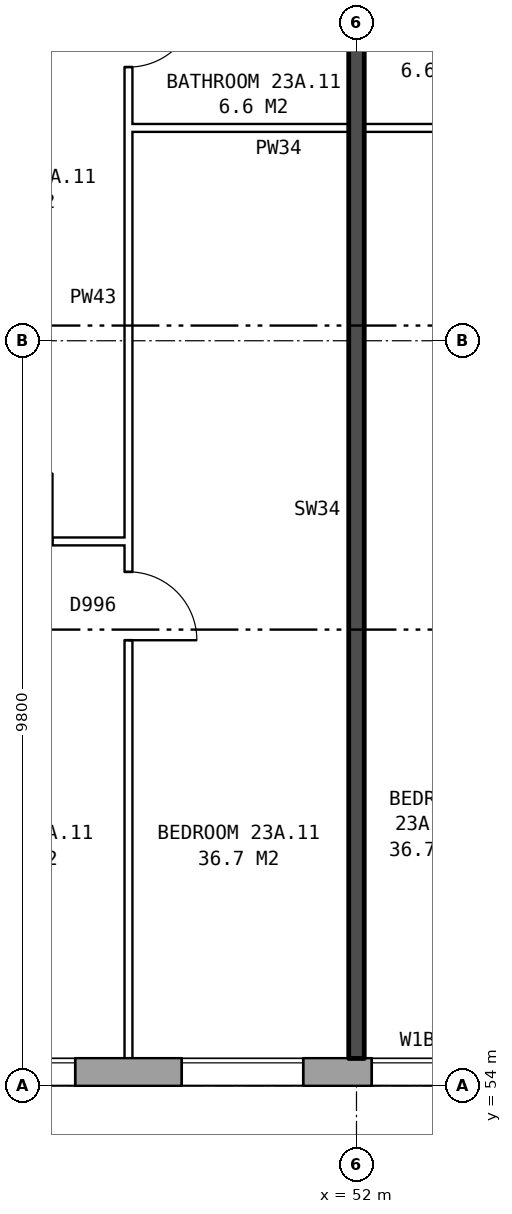
"""IFC4 building model, lengths in metres.
Left out: names, types, materials, properties, quantities, classifications, styles, units other than length and angle.
Written with IfcOpenShell. Run it as: python <this file> out.ifc"""

import sys

from ifc_helpers import new_model, si_unit, direction, frame, frame_2d, origin, place, context, subcontext, project, spatial, rectangle, extrude, element, fill, save


model = new_model("IFC4")
c1 = context("Model", 3, precision=1e-05, world=origin(), true_north=direction((0.0, 1.0)))
c2 = subcontext(c1, "Body", "Model", "MODEL_VIEW")
j1 = project(units=[si_unit("LENGTHUNIT", "METRE"), si_unit("PLANEANGLEUNIT", "RADIAN")], contexts=[c1])
p1 = place(None, origin())
s1 = spatial("IfcSite", under=j1, at=p1, CompositionType="ELEMENT")
p2 = place(p1, origin())
s2 = spatial("IfcBuilding", under=s1, at=p2, CompositionType="ELEMENT")
p3 = place(p2, frame((0.0, 0.0, 84.0)))
s3 = spatial("IfcBuildingStorey", under=s2, at=p3, CompositionType="ELEMENT", Elevation=84.0)
p4 = place(p3, frame((26.325, 54.18, 0.0), z_axis=(0.0, 0.0, 1.0), x_axis=(1.0, 0.0, 0.0)))
e1 = element("IfcWall", 1, at=p4, inside=s3, PredefinedType="STANDARD", context=c2, shape_type="SweptSolid", body=[
    extrude(rectangle(XDim=46.601, YDim=0.36, at=frame_2d((23.3, 0.0))), origin(), (0.0, 0.0, 1.0), 2.85),
])
p5 = place(p4, frame((2.375, 0.0, 0.8)))
e2 = element("IfcOpeningElement", 2, at=p5, cuts=e1, PredefinedType="OPENING", context=c2, shape_type="SweptSolid", body=[
    extrude(rectangle(XDim=1.6, YDim=1.8, at=frame_2d((0.8, 0.9))), frame((0.0, 0.19, 0.0), z_axis=(0.0, -1.0, 0.0), x_axis=(1.0, 0.0, 0.0)), (0.0, 0.0, 1.0), 0.38),
])
p6 = place(p4, frame((5.375, 0.0, 0.8)))
e3 = element("IfcOpeningElement", 3, at=p6, cuts=e1, PredefinedType="OPENING", context=c2, shape_type="SweptSolid", body=[
    extrude(rectangle(XDim=1.6, YDim=1.8, at=frame_2d((0.8, 0.9))), frame((0.0, 0.19, 0.0), z_axis=(0.0, -1.0, 0.0), x_axis=(1.0, 0.0, 0.0)), (0.0, 0.0, 1.0), 0.38),
])
p7 = place(p4, frame((8.375, 0.0, 0.8)))
e4 = element("IfcOpeningElement", 4, at=p7, cuts=e1, PredefinedType="OPENING", context=c2, shape_type="SweptSolid", body=[
    extrude(rectangle(XDim=1.6, YDim=1.8, at=frame_2d((0.8, 0.9))), frame((0.0, 0.19, 0.0), z_axis=(0.0, -1.0, 0.0), x_axis=(1.0, 0.0, 0.0)), (0.0, 0.0, 1.0), 0.38),
])
p8 = place(p4, frame((11.375, 0.0, 0.8)))
e5 = element("IfcOpeningElement", 5, at=p8, cuts=e1, PredefinedType="OPENING", context=c2, shape_type="SweptSolid", body=[
    extrude(rectangle(XDim=1.6, YDim=1.8, at=frame_2d((0.8, 0.9))), frame((0.0, 0.19, 0.0), z_axis=(0.0, -1.0, 0.0), x_axis=(1.0, 0.0, 0.0)), (0.0, 0.0, 1.0), 0.38),
])
p9 = place(p4, frame((14.375, 0.0, 0.8)))
e6 = element("IfcOpeningElement", 6, at=p9, cuts=e1, PredefinedType="OPENING", context=c2, shape_type="SweptSolid", body=[
    extrude(rectangle(XDim=1.6, YDim=1.8, at=frame_2d((0.8, 0.9))), frame((0.0, 0.19, 0.0), z_axis=(0.0, -1.0, 0.0), x_axis=(1.0, 0.0, 0.0)), (0.0, 0.0, 1.0), 0.38),
])
p10 = place(p4, frame((16.275, 0.0, 1.4)))
e7 = element("IfcOpeningElement", 7, at=p10, cuts=e1, PredefinedType="OPENING", context=c2, shape_type="SweptSolid", body=[
    extrude(rectangle(XDim=1.2, YDim=1.2, at=frame_2d((0.6, 0.6))), frame((0.0, 0.19, 0.0), z_axis=(0.0, -1.0, 0.0), x_axis=(1.0, 0.0, 0.0)), (0.0, 0.0, 1.0), 0.38),
])
p11 = place(p4, frame((20.375, 0.0, 0.8)))
e8 = element("IfcOpeningElement", 8, at=p11, cuts=e1, PredefinedType="OPENING", context=c2, shape_type="SweptSolid", body=[
    extrude(rectangle(XDim=1.6, YDim=1.8, at=frame_2d((0.8, 0.9))), frame((0.0, 0.19, 0.0), z_axis=(0.0, -1.0, 0.0), x_axis=(1.0, 0.0, 0.0)), (0.0, 0.0, 1.0), 0.38),
])
p12 = place(p4, frame((23.375, 0.0, 0.8)))
e9 = element("IfcOpeningElement", 9, at=p12, cuts=e1, PredefinedType="OPENING", context=c2, shape_type="SweptSolid", body=[
    extrude(rectangle(XDim=1.6, YDim=1.8, at=frame_2d((0.8, 0.9))), frame((0.0, 0.19, 0.0), z_axis=(0.0, -1.0, 0.0), x_axis=(1.0, 0.0, 0.0)), (0.0, 0.0, 1.0), 0.38),
])
p13 = place(p4, frame((25.875, 0.0, 0.15)))
e10 = element("IfcOpeningElement", 10, at=p13, cuts=e1, PredefinedType="OPENING", context=c2, shape_type="SweptSolid", body=[
    extrude(rectangle(XDim=1.2, YDim=1.8, at=frame_2d((0.6, 0.9))), frame((0.0, 0.19, 0.0), z_axis=(0.0, -1.0, 0.0), x_axis=(1.0, 0.0, 0.0)), (0.0, 0.0, 1.0), 0.38),
])
p14 = place(p4, frame((28.825, 0.0, 1.7)))
e11 = element("IfcOpeningElement", 11, at=p14, cuts=e1, PredefinedType="OPENING", context=c2, shape_type="SweptSolid", body=[
    extrude(rectangle(XDim=0.6, YDim=0.9, at=frame_2d((0.3, 0.45))), frame((0.0, 0.19, 0.0), z_axis=(0.0, -1.0, 0.0), x_axis=(1.0, 0.0, 0.0)), (0.0, 0.0, 1.0), 0.38),
])
p15 = place(p4, frame((32.375, 0.0, 0.8)))
e12 = element("IfcOpeningElement", 12, at=p15, cuts=e1, PredefinedType="OPENING", context=c2, shape_type="SweptSolid", body=[
    extrude(rectangle(XDim=1.6, YDim=1.8, at=frame_2d((0.8, 0.9))), frame((0.0, 0.19, 0.0), z_axis=(0.0, -1.0, 0.0), x_axis=(1.0, 0.0, 0.0)), (0.0, 0.0, 1.0), 0.38),
])
p16 = place(p4, frame((35.375, 0.0, 0.8)))
e13 = element("IfcOpeningElement", 13, at=p16, cuts=e1, PredefinedType="OPENING", context=c2, shape_type="SweptSolid", body=[
    extrude(rectangle(XDim=1.6, YDim=1.8, at=frame_2d((0.8, 0.9))), frame((0.0, 0.19, 0.0), z_axis=(0.0, -1.0, 0.0), x_axis=(1.0, 0.0, 0.0)), (0.0, 0.0, 1.0), 0.38),
])
p17 = place(p4, frame((38.375, 0.0, 0.8)))
e14 = element("IfcOpeningElement", 14, at=p17, cuts=e1, PredefinedType="OPENING", context=c2, shape_type="SweptSolid", body=[
    extrude(rectangle(XDim=1.6, YDim=1.8, at=frame_2d((0.8, 0.9))), frame((0.0, 0.19, 0.0), z_axis=(0.0, -1.0, 0.0), x_axis=(1.0, 0.0, 0.0)), (0.0, 0.0, 1.0), 0.38),
])
p18 = place(p4, frame((41.375, 0.0, 0.8)))
e15 = element("IfcOpeningElement", 15, at=p18, cuts=e1, PredefinedType="OPENING", context=c2, shape_type="SweptSolid", body=[
    extrude(rectangle(XDim=1.6, YDim=1.8, at=frame_2d((0.8, 0.9))), frame((0.0, 0.19, 0.0), z_axis=(0.0, -1.0, 0.0), x_axis=(1.0, 0.0, 0.0)), (0.0, 0.0, 1.0), 0.38),
])
p19 = place(p4, frame((44.375, 0.0, 0.8)))
e16 = element("IfcOpeningElement", 16, at=p19, cuts=e1, PredefinedType="OPENING", context=c2, shape_type="SweptSolid", body=[
    extrude(rectangle(XDim=1.6, YDim=1.8, at=frame_2d((0.8, 0.9))), frame((0.0, 0.19, 0.0), z_axis=(0.0, -1.0, 0.0), x_axis=(1.0, 0.0, 0.0)), (0.0, 0.0, 1.0), 0.38),
])
p20 = place(p4, frame((27.375, 0.0, 0.15)))
e17 = element("IfcOpeningElement", 17, at=p20, cuts=e1, PredefinedType="OPENING", context=c2, shape_type="SweptSolid", body=[
    extrude(rectangle(XDim=0.8, YDim=0.9, at=frame_2d((0.4, 0.45))), frame((0.0, 0.19, 0.0), z_axis=(0.0, -1.0, 0.0), x_axis=(1.0, 0.0, 0.0)), (0.0, 0.0, 1.0), 0.38),
])
p21 = place(p4, frame((29.775, 0.0, 0.8)))
e18 = element("IfcOpeningElement", 18, at=p21, cuts=e1, PredefinedType="OPENING", context=c2, shape_type="SweptSolid", body=[
    extrude(rectangle(XDim=1.6, YDim=1.8, at=frame_2d((0.8, 0.9))), frame((0.0, 0.19, 0.0), z_axis=(0.0, -1.0, 0.0), x_axis=(1.0, 0.0, 0.0)), (0.0, 0.0, 1.0), 0.38),
])
p22 = place(p3, frame((46.1, 61.16, 0.0), z_axis=(0.0, 0.0, 1.0), x_axis=(1.0, 0.0, 0.0)))
e19 = element("IfcWall", 19, at=p22, inside=s3, PredefinedType="PARTITIONING", context=c2, shape_type="SweptSolid", body=[
    extrude(rectangle(XDim=2.9, YDim=0.1, at=frame_2d((1.45, 0.0))), origin(), (0.0, 0.0, 1.0), 2.85),
])
p23 = place(p22, frame((1.0, 0.0, 0.0)))
e20 = element("IfcOpeningElement", 20, at=p23, cuts=e19, PredefinedType="OPENING", context=c2, shape_type="SweptSolid", body=[
    extrude(rectangle(XDim=0.9, YDim=2.1, at=frame_2d((0.45, 1.05))), frame((0.0, 0.06, 0.0), z_axis=(0.0, -1.0, 0.0), x_axis=(1.0, 0.0, 0.0)), (0.0, 0.0, 1.0), 0.12),
])
p24 = place(p3, frame((49.0, 66.6, 0.0), z_axis=(0.0, 0.0, 1.0), x_axis=(1.0, 0.0, 0.0)))
e21 = element("IfcWall", 21, at=p24, inside=s3, PredefinedType="PARTITIONING", context=c2, shape_type="SweptSolid", body=[
    extrude(rectangle(XDim=6.0, YDim=0.1, at=frame_2d((3.0, 0.0))), origin(), (0.0, 0.0, 1.0), 2.85),
])
p25 = place(p3, frame((49.0, 54.36, 0.0), z_axis=(0.0, 0.0, 1.0), x_axis=(0.0, 1.0, 0.0)))
e22 = element("IfcWall", 22, at=p25, inside=s3, PredefinedType="PARTITIONING", context=c2, shape_type="SweptSolid", body=[
    extrude(rectangle(XDim=14.34, YDim=0.1, at=frame_2d((7.17, 0.0))), origin(), (0.0, 0.0, 1.0), 2.85),
])
p26 = place(p25, frame((5.5, 0.0, 0.0)))
e23 = element("IfcOpeningElement", 23, at=p26, cuts=e22, PredefinedType="OPENING", context=c2, shape_type="SweptSolid", body=[
    extrude(rectangle(XDim=0.9, YDim=2.1, at=frame_2d((0.45, 1.05))), frame((0.0, 0.06, 0.0), z_axis=(0.0, -1.0, 0.0), x_axis=(1.0, 0.0, 0.0)), (0.0, 0.0, 1.0), 0.12),
])
p27 = place(p25, frame((13.04, 0.0, 0.0)))
e24 = element("IfcOpeningElement", 24, at=p27, cuts=e22, PredefinedType="OPENING", context=c2, shape_type="SweptSolid", body=[
    extrude(rectangle(XDim=0.9, YDim=2.1, at=frame_2d((0.45, 1.05))), frame((0.0, 0.06, 0.0), z_axis=(0.0, -1.0, 0.0), x_axis=(1.0, 0.0, 0.0)), (0.0, 0.0, 1.0), 0.12),
])
p28 = place(p3, frame((52.0, 54.36, 0.0), z_axis=(0.0, 0.0, 1.0), x_axis=(0.0, 1.0, 0.0)))
e25 = element("IfcWall", 25, at=p28, inside=s3, PredefinedType="SOLIDWALL", context=c2, shape_type="SweptSolid", body=[
    extrude(rectangle(XDim=14.44, YDim=0.2, at=frame_2d((7.22, 0.0))), origin(), (0.0, 0.0, 1.0), 2.85),
])
p29 = place(p11, origin())
e26 = element("IfcWindow", 26, at=p29, inside=s3, PartitioningType="SINGLE_PANEL", PredefinedType="WINDOW", context=c2, shape_type="SweptSolid", body=[
    extrude(rectangle(XDim=1.6, YDim=1.8, at=frame_2d((0.8, 0.9))), frame((0.0, 0.15, 0.0), z_axis=(0.0, -1.0, 0.0), x_axis=(1.0, 0.0, 0.0)), (0.0, 0.0, 1.0), 0.06),
])
fill(e8, e26)
p30 = place(p12, origin())
e27 = element("IfcWindow", 27, at=p30, inside=s3, PartitioningType="SINGLE_PANEL", PredefinedType="WINDOW", context=c2, shape_type="SweptSolid", body=[
    extrude(rectangle(XDim=1.6, YDim=1.8, at=frame_2d((0.8, 0.9))), frame((0.0, 0.15, 0.0), z_axis=(0.0, -1.0, 0.0), x_axis=(1.0, 0.0, 0.0)), (0.0, 0.0, 1.0), 0.06),
])
fill(e9, e27)
p31 = place(p13, origin())
e28 = element("IfcWindow", 28, at=p31, inside=s3, PartitioningType="SINGLE_PANEL", PredefinedType="WINDOW", context=c2, shape_type="SweptSolid", body=[
    extrude(rectangle(XDim=1.2, YDim=1.8, at=frame_2d((0.6, 0.9))), frame((0.0, 0.15, 0.0), z_axis=(0.0, -1.0, 0.0), x_axis=(1.0, 0.0, 0.0)), (0.0, 0.0, 1.0), 0.06),
])
fill(e10, e28)
p32 = place(p26, frame((0.9, 0.0, 0.0), z_axis=(0.0, 0.0, 1.0), x_axis=(-1.0, 0.0, 0.0)))
e29 = element("IfcDoor", 29, at=p32, inside=s3, OperationType="SINGLE_SWING_RIGHT", PredefinedType="DOOR", context=c2, shape_type="SweptSolid", body=[
    extrude(rectangle(XDim=0.9, YDim=2.1, at=frame_2d((0.45, 1.05))), frame((0.0, 0.025, 0.0), z_axis=(0.0, -1.0, 0.0), x_axis=(1.0, 0.0, 0.0)), (0.0, 0.0, 1.0), 0.05),
])
fill(e23, e29)
p33 = place(p27, frame((0.9, 0.0, 0.0), z_axis=(0.0, 0.0, 1.0), x_axis=(-1.0, 0.0, 0.0)))
e30 = element("IfcDoor", 30, at=p33, inside=s3, OperationType="SINGLE_SWING_LEFT", PredefinedType="DOOR", context=c2, shape_type="SweptSolid", body=[
    extrude(rectangle(XDim=0.9, YDim=2.1, at=frame_2d((0.45, 1.05))), frame((0.0, 0.025, 0.0), z_axis=(0.0, -1.0, 0.0), x_axis=(1.0, 0.0, 0.0)), (0.0, 0.0, 1.0), 0.05),
])
fill(e24, e30)
save(model, sys.argv[1])
